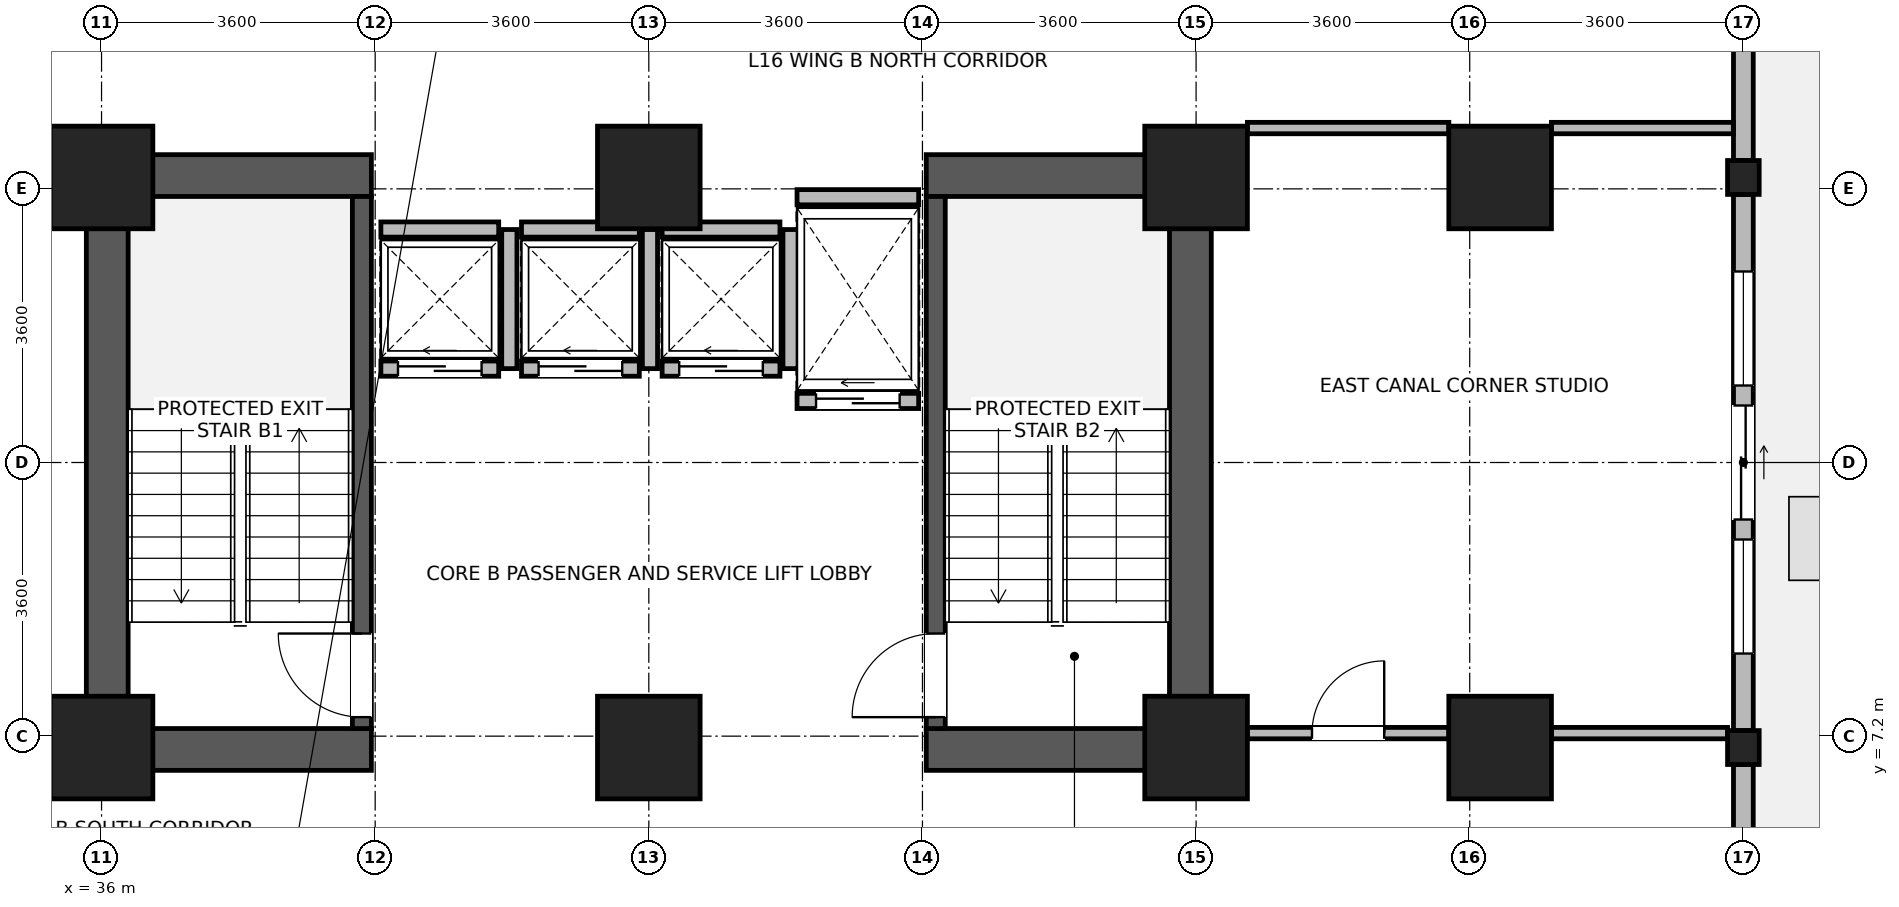
"""IFC4 building model, lengths in metres.
Left out: names, types, materials, properties, quantities, classifications, styles, units other than length and angle.
Written with IfcOpenShell. Run it as: python <this file> out.ifc"""

import sys

from ifc_helpers import new_model, si_unit, direction, frame, frame_2d, origin, origin_2d, place, context, subcontext, project, spatial, rectangle, i_section, extrude, source, transform, mapped, element, fill, save


model = new_model("IFC4")
c1 = context("Model", 3, precision=1e-05, world=origin(), true_north=direction((0.0, 1.0)))
c2 = subcontext(c1, "Body", "Model", "MODEL_VIEW")
j1 = project(units=[si_unit("LENGTHUNIT", "METRE"), si_unit("PLANEANGLEUNIT", "RADIAN")], contexts=[c1])
p1 = place(None, origin())
s1 = spatial("IfcSite", under=j1, at=p1, CompositionType="ELEMENT")
p2 = place(p1, origin())
s2 = spatial("IfcBuilding", under=s1, at=p2, CompositionType="ELEMENT")
p3 = place(p2, frame((0.0, 0.0, 66.0)))
s3 = spatial("IfcBuildingStorey", under=s2, at=p3, CompositionType="ELEMENT", Elevation=66.0)
for number, where, z_axis, x_axis in (
    (1, (36.075, 6.75, 0.0), (0.0, 0.0, 1.0), (0.0, 1.0, 0.0)),
    (2, (50.325, 6.75, 0.0), (0.0, 0.0, 1.0), (0.0, 1.0, 0.0)),
):
    element("IfcWall", number, at=place(p3, frame(where, z_axis=z_axis, x_axis=x_axis)), inside=s3, PredefinedType="SHEAR", context=c2, shape_type="SweptSolid", body=[
        extrude(rectangle(XDim=8.1, YDim=0.55, at=frame_2d((4.05, 0.0))), origin(), (0.0, 0.0, 1.0), 3.45),
    ])
for number, where, z_axis, x_axis in (
    (3, (36.35, 7.025, 0.0), (0.0, 0.0, 1.0), (1.0, 0.0, 0.0)),
    (4, (46.85, 7.025, 0.0), (0.0, 0.0, 1.0), (1.0, 0.0, 0.0)),
    (5, (36.35, 14.575, 0.0), (0.0, 0.0, 1.0), (1.0, 0.0, 0.0)),
    (6, (46.85, 14.575, 0.0), (0.0, 0.0, 1.0), (1.0, 0.0, 0.0)),
):
    element("IfcWall", number, at=place(p3, frame(where, z_axis=z_axis, x_axis=x_axis)), inside=s3, PredefinedType="SHEAR", context=c2, shape_type="SweptSolid", body=[
        extrude(rectangle(XDim=3.2, YDim=0.55, at=frame_2d((1.6, 0.0))), origin(), (0.0, 0.0, 1.0), 3.45),
    ])
p4 = place(p3, frame((39.425, 7.3, 0.0), z_axis=(0.0, 0.0, 1.0), x_axis=(0.0, 1.0, 0.0)))
e7 = element("IfcWall", 7, at=p4, inside=s3, PredefinedType="SHEAR", context=c2, shape_type="SweptSolid", body=[
    extrude(rectangle(XDim=7.0, YDim=0.25, at=frame_2d((3.5, 0.0))), origin(), (0.0, 0.0, 1.0), 3.45),
])
p5 = place(p4, frame((0.15, 0.0, 0.0)))
e8 = element("IfcOpeningElement", 8, at=p5, cuts=e7, PredefinedType="OPENING", context=c2, shape_type="SweptSolid", body=[
    extrude(rectangle(XDim=1.1, YDim=2.08, at=frame_2d((0.55, 1.04))), frame((0.0, 0.135, 0.0), z_axis=(0.0, -1.0, 0.0), x_axis=(1.0, 0.0, 0.0)), (0.0, 0.0, 1.0), 0.27),
])
p6 = place(p3, frame((46.975, 7.3, 0.0), z_axis=(0.0, 0.0, 1.0), x_axis=(0.0, 1.0, 0.0)))
e9 = element("IfcWall", 9, at=p6, inside=s3, PredefinedType="SHEAR", context=c2, shape_type="SweptSolid", body=[
    extrude(rectangle(XDim=7.0, YDim=0.25, at=frame_2d((3.5, 0.0))), origin(), (0.0, 0.0, 1.0), 3.45),
])
p7 = place(p6, frame((0.15, 0.0, 0.0)))
e10 = element("IfcOpeningElement", 10, at=p7, cuts=e9, PredefinedType="OPENING", context=c2, shape_type="SweptSolid", body=[
    extrude(rectangle(XDim=1.1, YDim=2.08, at=frame_2d((0.55, 1.04))), frame((0.0, 0.135, 0.0), z_axis=(0.0, -1.0, 0.0), x_axis=(1.0, 0.0, 0.0)), (0.0, 0.0, 1.0), 0.27),
])
m1 = source(origin(), c2, "Body", "SweptSolid", [
    extrude(rectangle(XDim=1.35, YDim=1.35, at=origin_2d()), origin(), (0.0, 0.0, 1.0), 3.7),
])
for number, where, z_axis, x_axis in (
    (11, (36.0, 7.05, 0.0), (0.0, 0.0, 1.0), (1.0, 0.0, 0.0)),
    (12, (36.0, 14.55, 0.0), (0.0, 0.0, 1.0), (1.0, 0.0, 0.0)),
    (13, (43.2, 7.05, 0.0), (0.0, 0.0, 1.0), (1.0, 0.0, 0.0)),
    (14, (43.2, 14.55, 0.0), (0.0, 0.0, 1.0), (1.0, 0.0, 0.0)),
    (15, (50.4, 7.05, 0.0), (0.0, 0.0, 1.0), (1.0, 0.0, 0.0)),
    (16, (50.4, 14.55, 0.0), (0.0, 0.0, 1.0), (1.0, 0.0, 0.0)),
    (17, (54.4, 7.05, 0.0), (0.0, 0.0, 1.0), (1.0, 0.0, 0.0)),
    (18, (54.4, 14.55, 0.0), (0.0, 0.0, 1.0), (1.0, 0.0, 0.0)),
):
    element("IfcColumn", number, at=place(p3, frame(where, z_axis=z_axis, x_axis=x_axis)), inside=s3, PredefinedType="COLUMN", context=c2, shape_type="MappedRepresentation", body=[
        mapped(m1, transform((0.0, 0.0, 0.0), x_axis=(1.0, 0.0, 0.0), y_axis=(0.0, 1.0, 0.0), z_axis=(0.0, 0.0, 1.0), scale=1.0)),
    ])
m2 = source(origin(), c2, "Body", "SweptSolid", [
    extrude(i_section(OverallWidth=0.416, OverallDepth=0.446, WebThickness=0.029, FlangeThickness=0.04, FilletRadius=0.015, at=origin_2d()), origin(), (0.0, 0.0, 1.0), 3.7),
])
for number, where, z_axis, x_axis in (
    (19, (57.6, 7.05, 0.0), (0.0, 0.0, 1.0), (1.0, 0.0, 0.0)),
    (20, (57.6, 14.55, 0.0), (0.0, 0.0, 1.0), (1.0, 0.0, 0.0)),
):
    element("IfcColumn", number, at=place(p3, frame(where, z_axis=z_axis, x_axis=x_axis)), inside=s3, PredefinedType="COLUMN", context=c2, shape_type="MappedRepresentation", body=[
        mapped(m2, transform((0.0, 0.0, 0.0), x_axis=(1.0, 0.0, 0.0), y_axis=(0.0, 1.0, 0.0), z_axis=(0.0, 0.0, 1.0), scale=1.0)),
    ])
p8 = place(p3, frame((57.6, 6.826, 0.0), z_axis=(0.0, 0.0, 1.0), x_axis=(0.0, -1.0, 0.0)))
e21 = element("IfcWall", 21, at=p8, inside=s3, PredefinedType="STANDARD", context=c2, shape_type="SweptSolid", body=[
    extrude(rectangle(XDim=2.156, YDim=0.26, at=frame_2d((1.078, 0.0))), origin(), (0.0, 0.0, 1.0), 3.43),
])
p9 = place(p3, frame((57.6, 14.326, 0.0), z_axis=(0.0, 0.0, 1.0), x_axis=(0.0, -1.0, 0.0)))
e22 = element("IfcWall", 22, at=p9, inside=s3, PredefinedType="STANDARD", context=c2, shape_type="SweptSolid", body=[
    extrude(rectangle(XDim=7.052, YDim=0.26, at=frame_2d((3.526, 0.0))), origin(), (0.0, 0.0, 1.0), 2.93),
])
p10 = place(p9, frame((2.776, 0.0, 0.0)))
e23 = element("IfcOpeningElement", 23, at=p10, cuts=e22, PredefinedType="OPENING", context=c2, shape_type="SweptSolid", body=[
    extrude(rectangle(XDim=1.5, YDim=2.15, at=frame_2d((0.75, 1.075))), frame((0.0, 0.14, 0.0), z_axis=(0.0, -1.0, 0.0), x_axis=(1.0, 0.0, 0.0)), (0.0, 0.0, 1.0), 0.28),
])
p11 = place(p9, frame((1.013, 0.0, 0.85)))
e24 = element("IfcOpeningElement", 24, at=p11, cuts=e22, PredefinedType="OPENING", context=c2, shape_type="SweptSolid", body=[
    extrude(rectangle(XDim=1.5, YDim=1.85, at=frame_2d((0.75, 0.925))), frame((0.0, 0.14, 0.0), z_axis=(0.0, -1.0, 0.0), x_axis=(1.0, 0.0, 0.0)), (0.0, 0.0, 1.0), 0.28),
])
p12 = place(p9, frame((4.539, 0.0, 0.85)))
e25 = element("IfcOpeningElement", 25, at=p12, cuts=e22, PredefinedType="OPENING", context=c2, shape_type="SweptSolid", body=[
    extrude(rectangle(XDim=1.5, YDim=1.85, at=frame_2d((0.75, 0.925))), frame((0.0, 0.14, 0.0), z_axis=(0.0, -1.0, 0.0), x_axis=(1.0, 0.0, 0.0)), (0.0, 0.0, 1.0), 0.28),
])
p13 = place(p3, frame((57.6, 21.376, 0.0), z_axis=(0.0, 0.0, 1.0), x_axis=(0.0, -1.0, 0.0)))
e26 = element("IfcWall", 26, at=p13, inside=s3, PredefinedType="STANDARD", context=c2, shape_type="SweptSolid", body=[
    extrude(rectangle(XDim=6.602, YDim=0.26, at=frame_2d((3.301, 0.0))), origin(), (0.0, 0.0, 1.0), 2.93),
])
p14 = place(p13, frame((0.9, 0.0, 0.85)))
e27 = element("IfcOpeningElement", 27, at=p14, cuts=e26, PredefinedType="OPENING", context=c2, shape_type="SweptSolid", body=[
    extrude(rectangle(XDim=1.5, YDim=1.85, at=frame_2d((0.75, 0.925))), frame((0.0, 0.14, 0.0), z_axis=(0.0, -1.0, 0.0), x_axis=(1.0, 0.0, 0.0)), (0.0, 0.0, 1.0), 0.28),
])
p15 = place(p13, frame((2.826, 0.0, 0.85)))
e28 = element("IfcOpeningElement", 28, at=p15, cuts=e26, PredefinedType="OPENING", context=c2, shape_type="SweptSolid", body=[
    extrude(rectangle(XDim=0.95, YDim=1.75, at=frame_2d((0.475, 0.875))), frame((0.0, 0.14, 0.0), z_axis=(0.0, -1.0, 0.0), x_axis=(1.0, 0.0, 0.0)), (0.0, 0.0, 1.0), 0.28),
])
p16 = place(p3, frame((39.675, 12.035, 0.0), z_axis=(0.0, 0.0, 1.0), x_axis=(1.0, 0.0, 0.0)))
e29 = element("IfcWall", 29, at=p16, inside=s3, PredefinedType="PARTITIONING", context=c2, shape_type="SweptSolid", body=[
    extrude(rectangle(XDim=1.55, YDim=0.2, at=frame_2d((0.775, 0.0))), origin(), (0.0, 0.0, 1.0), 3.43),
])
p17 = place(p16, frame((0.225, 0.0, 0.0)))
e30 = element("IfcOpeningElement", 30, at=p17, cuts=e29, PredefinedType="OPENING", context=c2, shape_type="SweptSolid", body=[
    extrude(rectangle(XDim=1.1, YDim=2.12, at=frame_2d((0.55, 1.06))), frame((0.0, 0.11, 0.0), z_axis=(0.0, -1.0, 0.0), x_axis=(1.0, 0.0, 0.0)), (0.0, 0.0, 1.0), 0.22),
])
p18 = place(p3, frame((39.675, 13.865, 0.0), z_axis=(0.0, 0.0, 1.0), x_axis=(1.0, 0.0, 0.0)))
e31 = element("IfcWall", 31, at=p18, inside=s3, PredefinedType="PARTITIONING", context=c2, shape_type="SweptSolid", body=[
    extrude(rectangle(XDim=1.55, YDim=0.2, at=frame_2d((0.775, 0.0))), origin(), (0.0, 0.0, 1.0), 3.43),
])
p19 = place(p3, frame((41.365, 12.035, 0.0), z_axis=(0.0, 0.0, 1.0), x_axis=(0.0, 1.0, 0.0)))
e32 = element("IfcWall", 32, at=p19, inside=s3, PredefinedType="PARTITIONING", context=c2, shape_type="SweptSolid", body=[
    extrude(rectangle(XDim=1.83, YDim=0.2, at=frame_2d((0.915, 0.0))), origin(), (0.0, 0.0, 1.0), 3.43),
])
p20 = place(p3, frame((41.525, 12.035, 0.0), z_axis=(0.0, 0.0, 1.0), x_axis=(1.0, 0.0, 0.0)))
e33 = element("IfcWall", 33, at=p20, inside=s3, PredefinedType="PARTITIONING", context=c2, shape_type="SweptSolid", body=[
    extrude(rectangle(XDim=1.55, YDim=0.2, at=frame_2d((0.775, 0.0))), origin(), (0.0, 0.0, 1.0), 3.43),
])
p21 = place(p20, frame((0.225, 0.0, 0.0)))
e34 = element("IfcOpeningElement", 34, at=p21, cuts=e33, PredefinedType="OPENING", context=c2, shape_type="SweptSolid", body=[
    extrude(rectangle(XDim=1.1, YDim=2.12, at=frame_2d((0.55, 1.06))), frame((0.0, 0.11, 0.0), z_axis=(0.0, -1.0, 0.0), x_axis=(1.0, 0.0, 0.0)), (0.0, 0.0, 1.0), 0.22),
])
p22 = place(p3, frame((41.525, 13.865, 0.0), z_axis=(0.0, 0.0, 1.0), x_axis=(1.0, 0.0, 0.0)))
e35 = element("IfcWall", 35, at=p22, inside=s3, PredefinedType="PARTITIONING", context=c2, shape_type="SweptSolid", body=[
    extrude(rectangle(XDim=1.55, YDim=0.2, at=frame_2d((0.775, 0.0))), origin(), (0.0, 0.0, 1.0), 3.43),
])
p23 = place(p3, frame((43.215, 12.035, 0.0), z_axis=(0.0, 0.0, 1.0), x_axis=(0.0, 1.0, 0.0)))
e36 = element("IfcWall", 36, at=p23, inside=s3, PredefinedType="PARTITIONING", context=c2, shape_type="SweptSolid", body=[
    extrude(rectangle(XDim=1.83, YDim=0.2, at=frame_2d((0.915, 0.0))), origin(), (0.0, 0.0, 1.0), 3.43),
])
p24 = place(p3, frame((43.375, 12.035, 0.0), z_axis=(0.0, 0.0, 1.0), x_axis=(1.0, 0.0, 0.0)))
e37 = element("IfcWall", 37, at=p24, inside=s3, PredefinedType="PARTITIONING", context=c2, shape_type="SweptSolid", body=[
    extrude(rectangle(XDim=1.55, YDim=0.2, at=frame_2d((0.775, 0.0))), origin(), (0.0, 0.0, 1.0), 3.43),
])
p25 = place(p24, frame((0.225, 0.0, 0.0)))
e38 = element("IfcOpeningElement", 38, at=p25, cuts=e37, PredefinedType="OPENING", context=c2, shape_type="SweptSolid", body=[
    extrude(rectangle(XDim=1.1, YDim=2.12, at=frame_2d((0.55, 1.06))), frame((0.0, 0.11, 0.0), z_axis=(0.0, -1.0, 0.0), x_axis=(1.0, 0.0, 0.0)), (0.0, 0.0, 1.0), 0.22),
])
p26 = place(p3, frame((43.375, 13.865, 0.0), z_axis=(0.0, 0.0, 1.0), x_axis=(1.0, 0.0, 0.0)))
e39 = element("IfcWall", 39, at=p26, inside=s3, PredefinedType="PARTITIONING", context=c2, shape_type="SweptSolid", body=[
    extrude(rectangle(XDim=1.55, YDim=0.2, at=frame_2d((0.775, 0.0))), origin(), (0.0, 0.0, 1.0), 3.43),
])
p27 = place(p3, frame((45.065, 12.035, 0.0), z_axis=(0.0, 0.0, 1.0), x_axis=(0.0, 1.0, 0.0)))
e40 = element("IfcWall", 40, at=p27, inside=s3, PredefinedType="PARTITIONING", context=c2, shape_type="SweptSolid", body=[
    extrude(rectangle(XDim=1.83, YDim=0.2, at=frame_2d((0.915, 0.0))), origin(), (0.0, 0.0, 1.0), 3.43),
])
p28 = place(p3, frame((45.15, 11.61, 0.0), z_axis=(0.0, 0.0, 1.0), x_axis=(1.0, 0.0, 0.0)))
e41 = element("IfcWall", 41, at=p28, inside=s3, PredefinedType="PARTITIONING", context=c2, shape_type="SweptSolid", body=[
    extrude(rectangle(XDim=1.6, YDim=0.2, at=frame_2d((0.8, 0.0))), origin(), (0.0, 0.0, 1.0), 3.43),
])
p29 = place(p28, frame((0.25, 0.0, 0.0)))
e42 = element("IfcOpeningElement", 42, at=p29, cuts=e41, PredefinedType="OPENING", context=c2, shape_type="SweptSolid", body=[
    extrude(rectangle(XDim=1.1, YDim=2.12, at=frame_2d((0.55, 1.06))), frame((0.0, 0.11, 0.0), z_axis=(0.0, -1.0, 0.0), x_axis=(1.0, 0.0, 0.0)), (0.0, 0.0, 1.0), 0.22),
])
p30 = place(p3, frame((45.15, 14.29, 0.0), z_axis=(0.0, 0.0, 1.0), x_axis=(1.0, 0.0, 0.0)))
e43 = element("IfcWall", 43, at=p30, inside=s3, PredefinedType="PARTITIONING", context=c2, shape_type="SweptSolid", body=[
    extrude(rectangle(XDim=1.6, YDim=0.2, at=frame_2d((0.8, 0.0))), origin(), (0.0, 0.0, 1.0), 2.23),
])
p31 = place(p3, frame((51.075, 7.24, 0.0), z_axis=(0.0, 0.0, 1.0), x_axis=(1.0, 0.0, 0.0)))
e44 = element("IfcWall", 44, at=p31, inside=s3, PredefinedType="PARTITIONING", context=c2, shape_type="SweptSolid", body=[
    extrude(rectangle(XDim=2.65, YDim=0.15, at=frame_2d((1.325, 0.0))), origin(), (0.0, 0.0, 1.0), 2.78),
])
p32 = place(p31, frame((0.85, 0.0, 0.0)))
e45 = element("IfcOpeningElement", 45, at=p32, cuts=e44, PredefinedType="OPENING", context=c2, shape_type="SweptSolid", body=[
    extrude(rectangle(XDim=0.95, YDim=2.1, at=frame_2d((0.475, 1.05))), frame((0.0, 0.085, 0.0), z_axis=(0.0, -1.0, 0.0), x_axis=(1.0, 0.0, 0.0)), (0.0, 0.0, 1.0), 0.17),
])
p33 = place(p3, frame((55.075, 7.24, 0.0), z_axis=(0.0, 0.0, 1.0), x_axis=(1.0, 0.0, 0.0)))
e46 = element("IfcWall", 46, at=p33, inside=s3, PredefinedType="PARTITIONING", context=c2, shape_type="SweptSolid", body=[
    extrude(rectangle(XDim=2.317, YDim=0.15, at=frame_2d((1.159, 0.0))), origin(), (0.0, 0.0, 1.0), 2.78),
])
p34 = place(p3, frame((51.075, 15.2, 0.0), z_axis=(0.0, 0.0, 1.0), x_axis=(1.0, 0.0, 0.0)))
e47 = element("IfcWall", 47, at=p34, inside=s3, PredefinedType="PARTITIONING", context=c2, shape_type="SweptSolid", body=[
    extrude(rectangle(XDim=2.65, YDim=0.15, at=frame_2d((1.325, 0.0))), origin(), (0.0, 0.0, 1.0), 3.43),
])
p35 = place(p3, frame((55.075, 15.2, 0.0), z_axis=(0.0, 0.0, 1.0), x_axis=(1.0, 0.0, 0.0)))
e48 = element("IfcWall", 48, at=p35, inside=s3, PredefinedType="PARTITIONING", context=c2, shape_type="SweptSolid", body=[
    extrude(rectangle(XDim=2.393, YDim=0.15, at=frame_2d((1.197, 0.0))), origin(), (0.0, 0.0, 1.0), 3.43),
])
p36 = place(p10, origin())
e49 = element("IfcDoor", 49, at=p36, inside=s3, OperationType="SLIDING_TO_LEFT", PredefinedType="DOOR", context=c2, shape_type="SweptSolid", body=[
    extrude(rectangle(XDim=1.5, YDim=2.15, at=frame_2d((0.75, 1.075))), frame((0.0, 0.025, 0.0), z_axis=(0.0, -1.0, 0.0), x_axis=(1.0, 0.0, 0.0)), (0.0, 0.0, 1.0), 0.05),
])
fill(e23, e49)
p37 = place(p11, origin())
e50 = element("IfcWindow", 50, at=p37, inside=s3, PartitioningType="SINGLE_PANEL", PredefinedType="WINDOW", context=c2, shape_type="SweptSolid", body=[
    extrude(rectangle(XDim=1.5, YDim=1.85, at=frame_2d((0.75, 0.925))), frame((0.0, 0.03, 0.0), z_axis=(0.0, -1.0, 0.0), x_axis=(1.0, 0.0, 0.0)), (0.0, 0.0, 1.0), 0.06),
])
fill(e24, e50)
p38 = place(p12, origin())
e51 = element("IfcWindow", 51, at=p38, inside=s3, PartitioningType="SINGLE_PANEL", PredefinedType="WINDOW", context=c2, shape_type="SweptSolid", body=[
    extrude(rectangle(XDim=1.5, YDim=1.85, at=frame_2d((0.75, 0.925))), frame((0.0, 0.03, 0.0), z_axis=(0.0, -1.0, 0.0), x_axis=(1.0, 0.0, 0.0)), (0.0, 0.0, 1.0), 0.06),
])
fill(e25, e51)
p39 = place(p5, origin())
e52 = element("IfcDoor", 52, at=p39, inside=s3, OperationType="SINGLE_SWING_RIGHT", PredefinedType="DOOR", context=c2, shape_type="SweptSolid", body=[
    extrude(rectangle(XDim=1.1, YDim=2.08, at=frame_2d((0.55, 1.04))), frame((0.0, 0.025, 0.0), z_axis=(0.0, -1.0, 0.0), x_axis=(1.0, 0.0, 0.0)), (0.0, 0.0, 1.0), 0.05),
])
fill(e8, e52)
p40 = place(p7, origin())
e53 = element("IfcDoor", 53, at=p40, inside=s3, OperationType="SINGLE_SWING_LEFT", PredefinedType="DOOR", context=c2, shape_type="SweptSolid", body=[
    extrude(rectangle(XDim=1.1, YDim=2.08, at=frame_2d((0.55, 1.04))), frame((0.0, 0.025, 0.0), z_axis=(0.0, -1.0, 0.0), x_axis=(1.0, 0.0, 0.0)), (0.0, 0.0, 1.0), 0.05),
])
fill(e10, e53)
p41 = place(p17, origin())
e54 = element("IfcDoor", 54, at=p41, inside=s3, OperationType="SLIDING_TO_LEFT", PredefinedType="DOOR", context=c2, shape_type="SweptSolid", body=[
    extrude(rectangle(XDim=1.1, YDim=2.12, at=frame_2d((0.55, 1.06))), frame((0.0, 0.025, 0.0), z_axis=(0.0, -1.0, 0.0), x_axis=(1.0, 0.0, 0.0)), (0.0, 0.0, 1.0), 0.05),
])
fill(e30, e54)
p42 = place(p21, origin())
e55 = element("IfcDoor", 55, at=p42, inside=s3, OperationType="SLIDING_TO_LEFT", PredefinedType="DOOR", context=c2, shape_type="SweptSolid", body=[
    extrude(rectangle(XDim=1.1, YDim=2.12, at=frame_2d((0.55, 1.06))), frame((0.0, 0.025, 0.0), z_axis=(0.0, -1.0, 0.0), x_axis=(1.0, 0.0, 0.0)), (0.0, 0.0, 1.0), 0.05),
])
fill(e34, e55)
p43 = place(p25, origin())
e56 = element("IfcDoor", 56, at=p43, inside=s3, OperationType="SLIDING_TO_LEFT", PredefinedType="DOOR", context=c2, shape_type="SweptSolid", body=[
    extrude(rectangle(XDim=1.1, YDim=2.12, at=frame_2d((0.55, 1.06))), frame((0.0, 0.025, 0.0), z_axis=(0.0, -1.0, 0.0), x_axis=(1.0, 0.0, 0.0)), (0.0, 0.0, 1.0), 0.05),
])
fill(e38, e56)
p44 = place(p29, origin())
e57 = element("IfcDoor", 57, at=p44, inside=s3, OperationType="SLIDING_TO_LEFT", PredefinedType="DOOR", context=c2, shape_type="SweptSolid", body=[
    extrude(rectangle(XDim=1.1, YDim=2.12, at=frame_2d((0.55, 1.06))), frame((0.0, 0.025, 0.0), z_axis=(0.0, -1.0, 0.0), x_axis=(1.0, 0.0, 0.0)), (0.0, 0.0, 1.0), 0.05),
])
fill(e42, e57)
p45 = place(p32, origin())
e58 = element("IfcDoor", 58, at=p45, inside=s3, OperationType="SINGLE_SWING_RIGHT", PredefinedType="DOOR", context=c2, shape_type="SweptSolid", body=[
    extrude(rectangle(XDim=0.95, YDim=2.1, at=frame_2d((0.475, 1.05))), frame((0.0, 0.025, 0.0), z_axis=(0.0, -1.0, 0.0), x_axis=(1.0, 0.0, 0.0)), (0.0, 0.0, 1.0), 0.05),
])
fill(e45, e58)
save(model, sys.argv[1])
